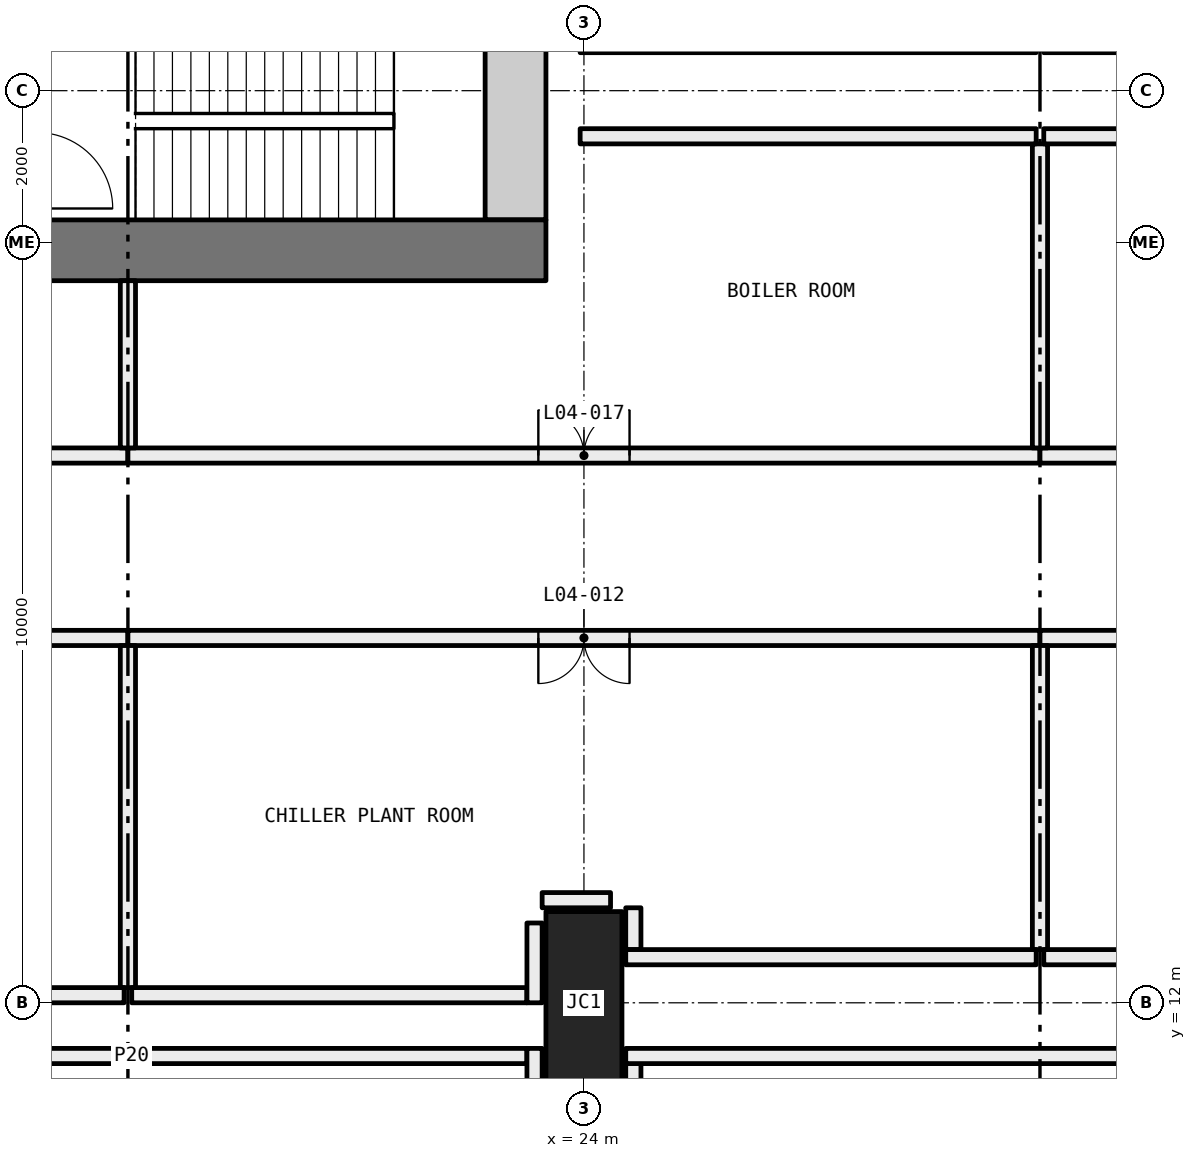
"""IFC4 building model, lengths in metres.
Left out: names, types, materials, properties, quantities, classifications, styles, units other than length and angle.
Written with IfcOpenShell. Run it as: python <this file> out.ifc"""

import sys

from ifc_helpers import new_model, si_unit, direction, frame, frame_2d, origin, origin_2d, place, context, subcontext, project, spatial, rectangle, hollow_rectangle, extrude, element, fill, save


model = new_model("IFC4")
c1 = context("Model", 3, precision=1e-05, world=origin(), true_north=direction((0.0, 1.0)))
c2 = subcontext(c1, "Body", "Model", "MODEL_VIEW")
j1 = project(units=[si_unit("LENGTHUNIT", "METRE"), si_unit("PLANEANGLEUNIT", "RADIAN")], contexts=[c1])
p1 = place(None, origin())
s1 = spatial("IfcSite", under=j1, at=p1, CompositionType="ELEMENT")
p2 = place(p1, origin())
s2 = spatial("IfcBuilding", under=s1, at=p2, CompositionType="ELEMENT")
p3 = place(p2, frame((0.0, 0.0, 24.0)))
s3 = spatial("IfcBuildingStorey", under=s2, at=p3, CompositionType="ELEMENT", Elevation=24.0)
p4 = place(p3, frame((24.0, 12.0, 0.0), z_axis=(0.0, 0.0, 1.0), x_axis=(0.0, 1.0, 0.0)))
e1 = element("IfcColumn", 1, at=p4, inside=s3, PredefinedType="COLUMN", context=c2, shape_type="SweptSolid", body=[
    extrude(hollow_rectangle(XDim=2.4, YDim=1.0, WallThickness=0.09, at=origin_2d()), origin(), (0.0, 0.0, 1.0), 5.6),
])
p5 = place(p3, frame((18.0, 16.8, 0.0), z_axis=(0.0, 0.0, 1.0), x_axis=(-1.0, 0.0, 0.0)))
e2 = element("IfcWall", 2, at=p5, inside=s3, PredefinedType="PARTITIONING", context=c2, shape_type="SweptSolid", body=[
    extrude(rectangle(XDim=9.6, YDim=0.2, at=frame_2d((4.8, 0.0))), origin(), (0.0, 0.0, 1.0), 5.6),
])
p6 = place(p5, frame((4.2, 0.0, 0.0)))
e3 = element("IfcOpeningElement", 3, at=p6, cuts=e2, PredefinedType="OPENING", context=c2, shape_type="SweptSolid", body=[
    extrude(rectangle(XDim=1.2, YDim=2.1, at=frame_2d((0.6, 1.05))), frame((0.0, 0.11, 0.0), z_axis=(0.0, -1.0, 0.0), x_axis=(1.0, 0.0, 0.0)), (0.0, 0.0, 1.0), 0.22),
])
p7 = place(p3, frame((30.0, 16.8, 0.0), z_axis=(0.0, 0.0, 1.0), x_axis=(-1.0, 0.0, 0.0)))
e4 = element("IfcWall", 4, at=p7, inside=s3, PredefinedType="PARTITIONING", context=c2, shape_type="SweptSolid", body=[
    extrude(rectangle(XDim=12.0, YDim=0.2, at=frame_2d((6.0, 0.0))), origin(), (0.0, 0.0, 1.0), 5.6),
])
p8 = place(p7, frame((5.4, 0.0, 0.0)))
e5 = element("IfcOpeningElement", 5, at=p8, cuts=e4, PredefinedType="OPENING", context=c2, shape_type="SweptSolid", body=[
    extrude(rectangle(XDim=1.2, YDim=2.1, at=frame_2d((0.6, 1.05))), frame((0.0, 0.11, 0.0), z_axis=(0.0, -1.0, 0.0), x_axis=(1.0, 0.0, 0.0)), (0.0, 0.0, 1.0), 0.22),
])
p9 = place(p3, frame((42.0, 16.8, 0.0), z_axis=(0.0, 0.0, 1.0), x_axis=(-1.0, 0.0, 0.0)))
e6 = element("IfcWall", 6, at=p9, inside=s3, PredefinedType="PARTITIONING", context=c2, shape_type="SweptSolid", body=[
    extrude(rectangle(XDim=12.0, YDim=0.2, at=frame_2d((6.0, 0.0))), origin(), (0.0, 0.0, 1.0), 5.6),
])
p10 = place(p9, frame((5.4, 0.0, 0.0)))
e7 = element("IfcOpeningElement", 7, at=p10, cuts=e6, PredefinedType="OPENING", context=c2, shape_type="SweptSolid", body=[
    extrude(rectangle(XDim=1.2, YDim=2.1, at=frame_2d((0.6, 1.05))), frame((0.0, 0.11, 0.0), z_axis=(0.0, -1.0, 0.0), x_axis=(1.0, 0.0, 0.0)), (0.0, 0.0, 1.0), 0.22),
])
p11 = place(p3, frame((8.5, 19.2, 0.0), z_axis=(0.0, 0.0, 1.0), x_axis=(1.0, 0.0, 0.0)))
e8 = element("IfcWall", 8, at=p11, inside=s3, PredefinedType="PARTITIONING", context=c2, shape_type="SweptSolid", body=[
    extrude(rectangle(XDim=9.5, YDim=0.2, at=frame_2d((4.75, 0.0))), origin(), (0.0, 0.0, 1.0), 5.6),
])
p12 = place(p11, frame((4.15, 0.0, 0.0)))
e9 = element("IfcOpeningElement", 9, at=p12, cuts=e8, PredefinedType="OPENING", context=c2, shape_type="SweptSolid", body=[
    extrude(rectangle(XDim=1.2, YDim=2.1, at=frame_2d((0.6, 1.05))), frame((0.0, 0.11, 0.0), z_axis=(0.0, -1.0, 0.0), x_axis=(1.0, 0.0, 0.0)), (0.0, 0.0, 1.0), 0.22),
])
p13 = place(p3, frame((18.0, 19.2, 0.0), z_axis=(0.0, 0.0, 1.0), x_axis=(1.0, 0.0, 0.0)))
e10 = element("IfcWall", 10, at=p13, inside=s3, PredefinedType="PARTITIONING", context=c2, shape_type="SweptSolid", body=[
    extrude(rectangle(XDim=12.0, YDim=0.2, at=frame_2d((6.0, 0.0))), origin(), (0.0, 0.0, 1.0), 5.6),
])
p14 = place(p13, frame((5.4, 0.0, 0.0)))
e11 = element("IfcOpeningElement", 11, at=p14, cuts=e10, PredefinedType="OPENING", context=c2, shape_type="SweptSolid", body=[
    extrude(rectangle(XDim=1.2, YDim=2.1, at=frame_2d((0.6, 1.05))), frame((0.0, 0.11, 0.0), z_axis=(0.0, -1.0, 0.0), x_axis=(1.0, 0.0, 0.0)), (0.0, 0.0, 1.0), 0.22),
])
p15 = place(p3, frame((30.0, 19.2, 0.0), z_axis=(0.0, 0.0, 1.0), x_axis=(1.0, 0.0, 0.0)))
e12 = element("IfcWall", 12, at=p15, inside=s3, PredefinedType="PARTITIONING", context=c2, shape_type="SweptSolid", body=[
    extrude(rectangle(XDim=12.0, YDim=0.2, at=frame_2d((6.0, 0.0))), origin(), (0.0, 0.0, 1.0), 5.6),
])
p16 = place(p15, frame((5.4, 0.0, 0.0)))
e13 = element("IfcOpeningElement", 13, at=p16, cuts=e12, PredefinedType="OPENING", context=c2, shape_type="SweptSolid", body=[
    extrude(rectangle(XDim=1.2, YDim=2.1, at=frame_2d((0.6, 1.05))), frame((0.0, 0.11, 0.0), z_axis=(0.0, -1.0, 0.0), x_axis=(1.0, 0.0, 0.0)), (0.0, 0.0, 1.0), 0.22),
])
p17 = place(p3, frame((18.0, 12.2, 0.0), z_axis=(0.0, 0.0, 1.0), x_axis=(0.0, 1.0, 0.0)))
e14 = element("IfcWall", 14, at=p17, inside=s3, PredefinedType="PARTITIONING", context=c2, shape_type="SweptSolid", body=[
    extrude(rectangle(XDim=4.5, YDim=0.2, at=frame_2d((2.25, 0.0))), origin(), (0.0, 0.0, 1.0), 5.6),
])
p18 = place(p3, frame((30.0, 12.7, 0.0), z_axis=(0.0, 0.0, 1.0), x_axis=(0.0, 1.0, 0.0)))
e15 = element("IfcWall", 15, at=p18, inside=s3, PredefinedType="PARTITIONING", context=c2, shape_type="SweptSolid", body=[
    extrude(rectangle(XDim=4.0, YDim=0.2, at=frame_2d((2.0, 0.0))), origin(), (0.0, 0.0, 1.0), 5.6),
])
p19 = place(p3, frame((18.0, 19.3, 0.0), z_axis=(0.0, 0.0, 1.0), x_axis=(0.0, 1.0, 0.0)))
e16 = element("IfcWall", 16, at=p19, inside=s3, PredefinedType="PARTITIONING", context=c2, shape_type="SweptSolid", body=[
    extrude(rectangle(XDim=2.2, YDim=0.2, at=frame_2d((1.1, 0.0))), origin(), (0.0, 0.0, 1.0), 5.6),
])
p20 = place(p3, frame((30.0, 19.3, 0.0), z_axis=(0.0, 0.0, 1.0), x_axis=(0.0, 1.0, 0.0)))
e17 = element("IfcWall", 17, at=p20, inside=s3, PredefinedType="PARTITIONING", context=c2, shape_type="SweptSolid", body=[
    extrude(rectangle(XDim=4.0, YDim=0.2, at=frame_2d((2.0, 0.0))), origin(), (0.0, 0.0, 1.0), 5.6),
])
p21 = place(p3, frame((12.85, 11.3, 0.0), z_axis=(0.0, 0.0, 1.0), x_axis=(1.0, 0.0, 0.0)))
e18 = element("IfcWall", 18, at=p21, inside=s3, PredefinedType="PARTITIONING", context=c2, shape_type="SweptSolid", body=[
    extrude(rectangle(XDim=10.4, YDim=0.2, at=frame_2d((5.2, 0.0))), origin(), (0.0, 0.0, 1.0), 5.6),
])
for number, where, z_axis, x_axis in (
    (19, (23.35, 11.4, 0.0), (0.0, 0.0, 1.0), (0.0, -1.0, 0.0)),
    (20, (24.65, 10.75, 0.0), (0.0, 0.0, 1.0), (0.0, 1.0, 0.0)),
):
    element("IfcWall", number, at=place(p3, frame(where, z_axis=z_axis, x_axis=x_axis)), inside=s3, PredefinedType="PARTITIONING", context=c2, shape_type="SweptSolid", body=[
        extrude(rectangle(XDim=0.45, YDim=0.2, at=frame_2d((0.225, 0.0))), origin(), (0.0, 0.0, 1.0), 5.6),
    ])
p22 = place(p3, frame((24.55, 11.3, 0.0), z_axis=(0.0, 0.0, 1.0), x_axis=(1.0, 0.0, 0.0)))
e21 = element("IfcWall", 21, at=p22, inside=s3, PredefinedType="PARTITIONING", context=c2, shape_type="SweptSolid", body=[
    extrude(rectangle(XDim=22.7, YDim=0.2, at=frame_2d((11.35, 0.0))), origin(), (0.0, 0.0, 1.0), 5.6),
])
p23 = place(p3, frame((12.85, 12.1, 0.0), z_axis=(0.0, 0.0, 1.0), x_axis=(1.0, 0.0, 0.0)))
e22 = element("IfcWall", 22, at=p23, inside=s3, PredefinedType="PARTITIONING", context=c2, shape_type="SweptSolid", body=[
    extrude(rectangle(XDim=5.1, YDim=0.2, at=frame_2d((2.55, 0.0))), origin(), (0.0, 0.0, 1.0), 5.0),
])
p24 = place(p3, frame((18.05, 12.1, 0.0), z_axis=(0.0, 0.0, 1.0), x_axis=(1.0, 0.0, 0.0)))
e23 = element("IfcWall", 23, at=p24, inside=s3, PredefinedType="PARTITIONING", context=c2, shape_type="SweptSolid", body=[
    extrude(rectangle(XDim=5.2, YDim=0.2, at=frame_2d((2.6, 0.0))), origin(), (0.0, 0.0, 1.0), 5.0),
])
p25 = place(p3, frame((23.35, 12.0, 0.0), z_axis=(0.0, 0.0, 1.0), x_axis=(0.0, 1.0, 0.0)))
e24 = element("IfcWall", 24, at=p25, inside=s3, PredefinedType="PARTITIONING", context=c2, shape_type="SweptSolid", body=[
    extrude(rectangle(XDim=1.05, YDim=0.2, at=frame_2d((0.525, 0.0))), origin(), (0.0, 0.0, 1.0), 5.0),
])
p26 = place(p3, frame((23.45, 13.35, 0.0), z_axis=(0.0, 0.0, 1.0), x_axis=(1.0, 0.0, 0.0)))
e25 = element("IfcWall", 25, at=p26, inside=s3, PredefinedType="PARTITIONING", context=c2, shape_type="SweptSolid", body=[
    extrude(rectangle(XDim=0.9, YDim=0.2, at=frame_2d((0.45, 0.0))), origin(), (0.0, 0.0, 1.0), 5.6),
])
p27 = place(p3, frame((24.65, 13.25, 0.0), z_axis=(0.0, 0.0, 1.0), x_axis=(0.0, -1.0, 0.0)))
e26 = element("IfcWall", 26, at=p27, inside=s3, PredefinedType="PARTITIONING", context=c2, shape_type="SweptSolid", body=[
    extrude(rectangle(XDim=0.55, YDim=0.2, at=frame_2d((0.275, 0.0))), origin(), (0.0, 0.0, 1.0), 5.6),
])
p28 = place(p3, frame((24.55, 12.6, 0.0), z_axis=(0.0, 0.0, 1.0), x_axis=(1.0, 0.0, 0.0)))
e27 = element("IfcWall", 27, at=p28, inside=s3, PredefinedType="PARTITIONING", context=c2, shape_type="SweptSolid", body=[
    extrude(rectangle(XDim=5.4, YDim=0.2, at=frame_2d((2.7, 0.0))), origin(), (0.0, 0.0, 1.0), 5.6),
])
p29 = place(p3, frame((30.05, 12.6, 0.0), z_axis=(0.0, 0.0, 1.0), x_axis=(1.0, 0.0, 0.0)))
e28 = element("IfcWall", 28, at=p29, inside=s3, PredefinedType="PARTITIONING", context=c2, shape_type="SweptSolid", body=[
    extrude(rectangle(XDim=11.9, YDim=0.2, at=frame_2d((5.95, 0.0))), origin(), (0.0, 0.0, 1.0), 5.6),
])
p30 = place(p3, frame((29.95, 23.4, 0.0), z_axis=(0.0, 0.0, 1.0), x_axis=(-1.0, 0.0, 0.0)))
e29 = element("IfcWall", 29, at=p30, inside=s3, PredefinedType="PARTITIONING", context=c2, shape_type="SweptSolid", body=[
    extrude(rectangle(XDim=6.0, YDim=0.2, at=frame_2d((3.0, 0.0))), origin(), (0.0, 0.0, 1.0), 5.6),
])
p31 = place(p3, frame((41.95, 23.4, 0.0), z_axis=(0.0, 0.0, 1.0), x_axis=(-1.0, 0.0, 0.0)))
e30 = element("IfcWall", 30, at=p31, inside=s3, PredefinedType="PARTITIONING", context=c2, shape_type="SweptSolid", body=[
    extrude(rectangle(XDim=11.9, YDim=0.2, at=frame_2d((5.95, 0.0))), origin(), (0.0, 0.0, 1.0), 5.6),
])
p32 = place(p3, frame((12.5, 21.9, 0.0), z_axis=(0.0, 0.0, 1.0), x_axis=(1.0, 0.0, 0.0)))
e31 = element("IfcWall", 31, at=p32, inside=s3, PredefinedType="SHEAR", context=c2, shape_type="SweptSolid", body=[
    extrude(rectangle(XDim=11.0, YDim=0.8, at=frame_2d((5.5, 0.0))), origin(), (0.0, 0.0, 1.0), 5.6),
])
p33 = place(p3, frame((23.1, 22.3, 0.0), z_axis=(0.0, 0.0, 1.0), x_axis=(0.0, 1.0, 0.0)))
e32 = element("IfcWall", 32, at=p33, inside=s3, PredefinedType="SHEAR", context=c2, shape_type="SweptSolid", body=[
    extrude(rectangle(XDim=15.4, YDim=0.8, at=frame_2d((7.7, 0.0))), origin(), (0.0, 0.0, 1.0), 5.6),
])
p34 = place(p33, frame((6.9, 0.0, 0.0)))
e33 = element("IfcOpeningElement", 33, at=p34, cuts=e32, PredefinedType="OPENING", context=c2, shape_type="SweptSolid", body=[
    extrude(rectangle(XDim=1.6, YDim=2.1, at=frame_2d((0.8, 1.05))), frame((0.0, 0.41, 0.0), z_axis=(0.0, -1.0, 0.0), x_axis=(1.0, 0.0, 0.0)), (0.0, 0.0, 1.0), 0.82),
])
p35 = place(p8, origin())
e34 = element("IfcDoor", 34, at=p35, inside=s3, OperationType="DOUBLE_DOOR_SINGLE_SWING", PredefinedType="DOOR", context=c2, shape_type="SweptSolid", body=[
    extrude(rectangle(XDim=1.2, YDim=2.1, at=frame_2d((0.6, 1.05))), frame((0.0, 0.025, 0.0), z_axis=(0.0, -1.0, 0.0), x_axis=(1.0, 0.0, 0.0)), (0.0, 0.0, 1.0), 0.05),
])
fill(e5, e34)
p36 = place(p14, origin())
e35 = element("IfcDoor", 35, at=p36, inside=s3, OperationType="DOUBLE_DOOR_SINGLE_SWING", PredefinedType="DOOR", context=c2, shape_type="SweptSolid", body=[
    extrude(rectangle(XDim=1.2, YDim=2.1, at=frame_2d((0.6, 1.05))), frame((0.0, 0.025, 0.0), z_axis=(0.0, -1.0, 0.0), x_axis=(1.0, 0.0, 0.0)), (0.0, 0.0, 1.0), 0.05),
])
fill(e11, e35)
save(model, sys.argv[1])
